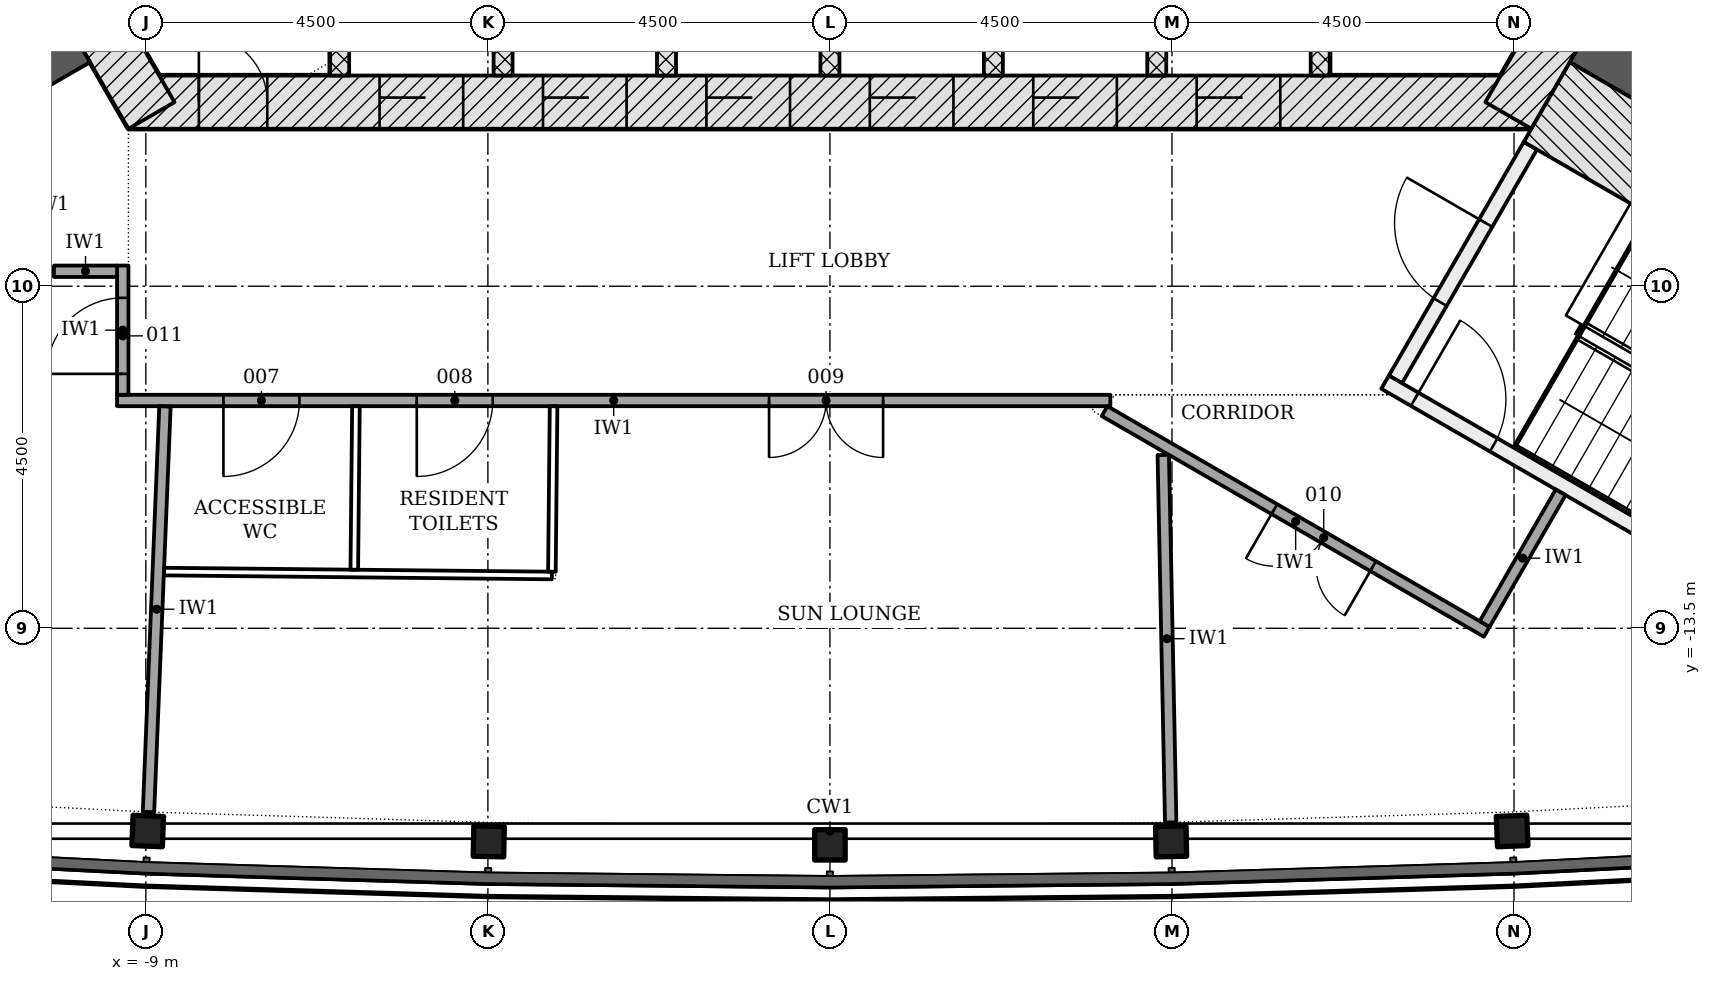
"""IFC4 building model, lengths in metres.
Left out: names, types, materials, properties, quantities, classifications, styles, units other than length and angle.
Written with IfcOpenShell. Run it as: python <this file> out.ifc"""

import sys

from ifc_helpers import new_model, si_unit, direction, frame, frame_2d, origin, origin_2d, place, context, subcontext, project, spatial, rectangle, i_section, extrude, element, fill, save


model = new_model("IFC4")
c1 = context("Model", 3, precision=1e-05, world=origin(), true_north=direction((0.0, 1.0)))
c2 = subcontext(c1, "Body", "Model", "MODEL_VIEW")
j1 = project(units=[si_unit("LENGTHUNIT", "METRE"), si_unit("PLANEANGLEUNIT", "RADIAN")], contexts=[c1])
p1 = place(None, origin())
s1 = spatial("IfcSite", under=j1, at=p1, CompositionType="ELEMENT")
p2 = place(p1, origin())
s2 = spatial("IfcBuilding", under=s1, at=p2, CompositionType="ELEMENT")
p3 = place(p2, frame((0.0, 0.0, 116.7)))
s3 = spatial("IfcBuildingStorey", under=s2, at=p3, CompositionType="ELEMENT", Elevation=116.7)
p4 = place(p3, frame((-9.229, -6.578, -0.2), z_axis=(0.0, 0.0, 1.0), x_axis=(1.0, 0.0, 0.0)))
e1 = element("IfcWall", 1, at=p4, inside=s3, PredefinedType="SHEAR", context=c2, shape_type="SweptSolid", body=[
    extrude(rectangle(XDim=18.458, YDim=0.7, at=frame_2d((9.229, 0.0))), origin(), (0.0, 0.0, 1.0), 3.6),
])
p5 = place(p4, frame((3.304, 0.0, 0.2)))
e2 = element("IfcOpeningElement", 2, at=p5, cuts=e1, PredefinedType="OPENING", context=c2, shape_type="SweptSolid", body=[
    extrude(rectangle(XDim=1.1, YDim=2.1, at=frame_2d((0.55, 1.05))), frame((0.0, 0.36, 0.0), z_axis=(0.0, -1.0, 0.0), x_axis=(1.0, 0.0, 0.0)), (0.0, 0.0, 1.0), 0.72),
])
p6 = place(p4, frame((5.454, 0.0, 0.2)))
e3 = element("IfcOpeningElement", 3, at=p6, cuts=e1, PredefinedType="OPENING", context=c2, shape_type="SweptSolid", body=[
    extrude(rectangle(XDim=1.1, YDim=2.1, at=frame_2d((0.55, 1.05))), frame((0.0, 0.36, 0.0), z_axis=(0.0, -1.0, 0.0), x_axis=(1.0, 0.0, 0.0)), (0.0, 0.0, 1.0), 0.72),
])
p7 = place(p4, frame((7.604, 0.0, 0.2)))
e4 = element("IfcOpeningElement", 4, at=p7, cuts=e1, PredefinedType="OPENING", context=c2, shape_type="SweptSolid", body=[
    extrude(rectangle(XDim=1.1, YDim=2.1, at=frame_2d((0.55, 1.05))), frame((0.0, 0.36, 0.0), z_axis=(0.0, -1.0, 0.0), x_axis=(1.0, 0.0, 0.0)), (0.0, 0.0, 1.0), 0.72),
])
p8 = place(p4, frame((9.754, 0.0, 0.2)))
e5 = element("IfcOpeningElement", 5, at=p8, cuts=e1, PredefinedType="OPENING", context=c2, shape_type="SweptSolid", body=[
    extrude(rectangle(XDim=1.1, YDim=2.1, at=frame_2d((0.55, 1.05))), frame((0.0, 0.36, 0.0), z_axis=(0.0, -1.0, 0.0), x_axis=(1.0, 0.0, 0.0)), (0.0, 0.0, 1.0), 0.72),
])
p9 = place(p4, frame((11.904, 0.0, 0.2)))
e6 = element("IfcOpeningElement", 6, at=p9, cuts=e1, PredefinedType="OPENING", context=c2, shape_type="SweptSolid", body=[
    extrude(rectangle(XDim=1.1, YDim=2.1, at=frame_2d((0.55, 1.05))), frame((0.0, 0.36, 0.0), z_axis=(0.0, -1.0, 0.0), x_axis=(1.0, 0.0, 0.0)), (0.0, 0.0, 1.0), 0.72),
])
p10 = place(p4, frame((14.054, 0.0, 0.2)))
e7 = element("IfcOpeningElement", 7, at=p10, cuts=e1, PredefinedType="OPENING", context=c2, shape_type="SweptSolid", body=[
    extrude(rectangle(XDim=1.1, YDim=2.1, at=frame_2d((0.55, 1.05))), frame((0.0, 0.36, 0.0), z_axis=(0.0, -1.0, 0.0), x_axis=(1.0, 0.0, 0.0)), (0.0, 0.0, 1.0), 0.72),
])
p11 = place(p4, frame((0.926, 0.0, 0.2)))
e8 = element("IfcOpeningElement", 8, at=p11, cuts=e1, PredefinedType="OPENING", context=c2, shape_type="SweptSolid", body=[
    extrude(rectangle(XDim=0.9, YDim=2.1, at=frame_2d((0.45, 1.05))), frame((0.0, 0.36, 0.0), z_axis=(0.0, -1.0, 0.0), x_axis=(1.0, 0.0, 0.0)), (0.0, 0.0, 1.0), 0.72),
])
for number, where, z_axis, x_axis in (
    (9, (8.926, -6.753, -0.2), (0.0, 0.0, 1.0), (0.5, 0.866, 0.0)),
    (10, (-10.311, -4.353, -0.2), (0.0, 0.0, 1.0), (0.5, -0.866, 0.0)),
):
    element("IfcWall", number, at=place(p3, frame(where, z_axis=z_axis, x_axis=x_axis)), inside=s3, PredefinedType="SHEAR", context=c2, shape_type="SweptSolid", body=[
        extrude(rectangle(XDim=2.771, YDim=0.7, at=frame_2d((1.386, 0.0))), origin(), (0.0, 0.0, 1.0), 3.6),
    ])
for number, where, z_axis, x_axis in (
    (11, (-9.922, -5.728, -0.2), (0.0, 0.0, 1.0), (-0.866, -0.5, 0.0)),
    (12, (9.922, -5.728, -0.2), (0.0, 0.0, 1.0), (0.866, -0.5, 0.0)),
):
    element("IfcWall", number, at=place(p3, frame(where, z_axis=z_axis, x_axis=x_axis)), inside=s3, PredefinedType="SHEAR", context=c2, shape_type="SweptSolid", body=[
        extrude(rectangle(XDim=11.539, YDim=0.75, at=frame_2d((5.769, 0.0))), origin(), (0.0, 0.0, 1.0), 3.6),
    ])
for number, where, z_axis, x_axis in (
    (13, (-8.975, -16.167, -0.2), (0.0, 0.0, 1.0), (0.999, -0.041, 0.0)),
    (14, (-4.489, -16.304, -0.2), (0.0, 0.0, 1.0), (1.0, -0.02, 0.0)),
    (15, (0.0, -16.349, -0.2), (0.0, 0.0, 1.0), (1.0, 0.0, 0.0)),
    (16, (4.489, -16.304, -0.2), (0.0, 0.0, 1.0), (1.0, 0.02, 0.0)),
    (17, (8.975, -16.167, -0.2), (0.0, 0.0, 1.0), (0.999, 0.041, 0.0)),
):
    element("IfcColumn", number, at=place(p3, frame(where, z_axis=z_axis, x_axis=x_axis)), inside=s3, PredefinedType="COLUMN", context=c2, shape_type="SweptSolid", body=[
        extrude(i_section(OverallWidth=0.401, OverallDepth=0.399, WebThickness=0.025, FlangeThickness=0.04, FilletRadius=0.015, at=origin_2d()), origin(), (0.0, 0.0, 1.0), 3.6),
    ])
for number, where, z_axis, x_axis in (
    (18, (-6.45, -6.228, -0.2), (0.0, 0.0, 1.0), (0.0, 1.0, 0.0)),
    (19, (-4.3, -6.228, -0.2), (0.0, 0.0, 1.0), (0.0, 1.0, 0.0)),
    (20, (-2.15, -6.228, -0.2), (0.0, 0.0, 1.0), (0.0, 1.0, 0.0)),
    (21, (0.0, -6.228, -0.2), (0.0, 0.0, 1.0), (0.0, 1.0, 0.0)),
    (22, (2.15, -6.228, -0.2), (0.0, 0.0, 1.0), (0.0, 1.0, 0.0)),
    (23, (4.3, -6.228, -0.2), (0.0, 0.0, 1.0), (0.0, 1.0, 0.0)),
    (24, (6.45, -6.228, -0.2), (0.0, 0.0, 1.0), (0.0, 1.0, 0.0)),
):
    element("IfcWall", number, at=place(p3, frame(where, z_axis=z_axis, x_axis=x_axis)), inside=s3, PredefinedType="PARTITIONING", context=c2, shape_type="SweptSolid", body=[
        extrude(rectangle(XDim=2.5, YDim=0.25, at=frame_2d((1.25, 0.0))), origin(), (0.0, 0.0, 1.0), 3.6),
    ])
p12 = place(p3, frame((-10.412, -4.879, -0.2), z_axis=(0.0, 0.0, 1.0), x_axis=(-0.866026919366, -0.499997374926, 0.0)))
e25 = element("IfcWall", 25, at=p12, inside=s3, PredefinedType="SHEAR", context=c2, shape_type="SweptSolid", body=[
    extrude(rectangle(XDim=7.2, YDim=1.211, at=frame_2d((3.6, 0.0))), origin(), (0.0, 0.0, 1.0), 3.6),
])
p13 = place(p3, frame((7.44, -10.226, -0.2), z_axis=(0.0, 0.0, 1.0), x_axis=(0.500022077904, 0.866012656725, 0.0)))
e26 = element("IfcWall", 26, at=p13, inside=s3, PredefinedType="SHEAR", context=c2, shape_type="SweptSolid", body=[
    extrude(rectangle(XDim=3.55, YDim=0.2, at=frame_2d((1.775, 0.0))), origin(), (0.0, 0.0, 1.0), 3.6),
])
p14 = place(p13, frame((1.175, 0.0, 0.2)))
e27 = element("IfcOpeningElement", 27, at=p14, cuts=e26, PredefinedType="OPENING", context=c2, shape_type="SweptSolid", body=[
    extrude(rectangle(XDim=1.2, YDim=2.1, at=frame_2d((0.6, 1.05))), frame((0.0, 0.11, 0.0), z_axis=(0.0, -1.0, 0.0), x_axis=(1.0, 0.0, 0.0)), (0.0, 0.0, 1.0), 0.22),
])
p15 = place(p3, frame((7.304, -10.262, -0.2), z_axis=(0.0, 0.0, 1.0), x_axis=(0.866026594901, -0.49999793692, 0.0)))
e28 = element("IfcWall", 28, at=p15, inside=s3, PredefinedType="SHEAR", context=c2, shape_type="SweptSolid", body=[
    extrude(rectangle(XDim=5.6, YDim=0.2, at=frame_2d((2.8, 0.0))), origin(), (0.0, 0.0, 1.0), 3.6),
])
p16 = place(p15, frame((0.45, 0.0, 0.2)))
e29 = element("IfcOpeningElement", 29, at=p16, cuts=e28, PredefinedType="OPENING", context=c2, shape_type="SweptSolid", body=[
    extrude(rectangle(XDim=1.2, YDim=2.1, at=frame_2d((0.6, 1.05))), frame((0.0, 0.11, 0.0), z_axis=(0.0, -1.0, 0.0), x_axis=(1.0, 0.0, 0.0)), (0.0, 0.0, 1.0), 0.22),
])
p17 = place(p3, frame((9.431, -6.577, -0.2), z_axis=(0.0, 0.0, 1.0), x_axis=(0.866018442252, -0.500012057535, 0.0)))
e30 = element("IfcWall", 30, at=p17, inside=s3, PredefinedType="SHEAR", context=c2, shape_type="SweptSolid", body=[
    extrude(rectangle(XDim=7.2, YDim=1.211, at=frame_2d((3.6, 0.0))), origin(), (0.0, 0.0, 1.0), 3.6),
])
p18 = place(p3, frame((3.689, -10.503, 0.0), z_axis=(0.0, 0.0, 1.0), x_axis=(-1.0, 0.0, 0.0)))
e31 = element("IfcWall", 31, at=p18, inside=s3, PredefinedType="PARTITIONING", context=c2, shape_type="SweptSolid", body=[
    extrude(rectangle(XDim=13.068, YDim=0.15, at=frame_2d((6.534, 0.0))), origin(), (0.0, 0.0, 1.0), 2.847),
])
p19 = place(p18, frame((10.668, 0.0, 0.0)))
e32 = element("IfcOpeningElement", 32, at=p19, cuts=e31, PredefinedType="OPENING", context=c2, shape_type="SweptSolid", body=[
    extrude(rectangle(XDim=1.0, YDim=2.1, at=frame_2d((0.5, 1.05))), frame((0.0, 0.085, 0.0), z_axis=(0.0, -1.0, 0.0), x_axis=(1.0, 0.0, 0.0)), (0.0, 0.0, 1.0), 0.17),
])
p20 = place(p18, frame((8.125, 0.0, 0.0)))
e33 = element("IfcOpeningElement", 33, at=p20, cuts=e31, PredefinedType="OPENING", context=c2, shape_type="SweptSolid", body=[
    extrude(rectangle(XDim=1.0, YDim=2.1, at=frame_2d((0.5, 1.05))), frame((0.0, 0.085, 0.0), z_axis=(0.0, -1.0, 0.0), x_axis=(1.0, 0.0, 0.0)), (0.0, 0.0, 1.0), 0.17),
])
p21 = place(p18, frame((2.99, 0.0, 0.0)))
e34 = element("IfcOpeningElement", 34, at=p21, cuts=e31, PredefinedType="OPENING", context=c2, shape_type="SweptSolid", body=[
    extrude(rectangle(XDim=1.5, YDim=2.1, at=frame_2d((0.75, 1.05))), frame((0.0, 0.085, 0.0), z_axis=(0.0, -1.0, 0.0), x_axis=(1.0, 0.0, 0.0)), (0.0, 0.0, 1.0), 0.17),
])
p22 = place(p3, frame((8.641, -13.546, 0.0), z_axis=(0.0, 0.0, 1.0), x_axis=(-0.866042728627, 0.499969991291, 0.0)))
e35 = element("IfcWall", 35, at=p22, inside=s3, PredefinedType="PARTITIONING", context=c2, shape_type="SweptSolid", body=[
    extrude(rectangle(XDim=5.805, YDim=0.15, at=frame_2d((2.903, 0.0))), origin(), (0.0, 0.0, 1.0), 2.847),
])
p23 = place(p22, frame((1.726, 0.0, 0.0)))
e36 = element("IfcOpeningElement", 36, at=p23, cuts=e35, PredefinedType="OPENING", context=c2, shape_type="SweptSolid", body=[
    extrude(rectangle(XDim=1.5, YDim=2.1, at=frame_2d((0.75, 1.05))), frame((0.0, 0.085, 0.0), z_axis=(0.0, -1.0, 0.0), x_axis=(1.0, 0.0, 0.0)), (0.0, 0.0, 1.0), 0.17),
])
p24 = place(p3, frame((-11.358, -6.99, 0.0), z_axis=(0.0, 0.0, 1.0), x_axis=(0.500050590816, -0.865996193193, 0.0)))
e37 = element("IfcWall", 37, at=p24, inside=s3, PredefinedType="PARTITIONING", context=c2, shape_type="SweptSolid", body=[
    extrude(rectangle(XDim=2.168, YDim=0.15, at=frame_2d((1.084, 0.0))), origin(), (0.0, 0.0, 1.0), 3.4),
])
p25 = place(p3, frame((8.614, -13.444, 0.0), z_axis=(0.0, 0.0, 1.0), x_axis=(0.499972520799, 0.866041268327, 0.0)))
e38 = element("IfcWall", 38, at=p25, inside=s3, PredefinedType="PARTITIONING", context=c2, shape_type="SweptSolid", body=[
    extrude(rectangle(XDim=2.0, YDim=0.15, at=frame_2d((1.0, 0.0))), origin(), (0.0, 0.0, 1.0), 2.923),
])
p26 = place(p3, frame((-9.304, -10.428, 0.0), z_axis=(0.0, 0.0, 1.0), x_axis=(0.0, 1.0, 0.0)))
e39 = element("IfcWall", 39, at=p26, inside=s3, PredefinedType="PARTITIONING", context=c2, shape_type="SweptSolid", body=[
    extrude(rectangle(XDim=1.7, YDim=0.15, at=frame_2d((0.85, 0.0))), origin(), (0.0, 0.0, 1.0), 3.4),
])
p27 = place(p26, frame((0.275, 0.0, 0.0)))
e40 = element("IfcOpeningElement", 40, at=p27, cuts=e39, PredefinedType="OPENING", context=c2, shape_type="SweptSolid", body=[
    extrude(rectangle(XDim=1.0, YDim=2.1, at=frame_2d((0.5, 1.05))), frame((0.0, 0.085, 0.0), z_axis=(0.0, -1.0, 0.0), x_axis=(1.0, 0.0, 0.0)), (0.0, 0.0, 1.0), 0.17),
])
p28 = place(p3, frame((-10.209, -8.803, 0.0), z_axis=(0.0, 0.0, 1.0), x_axis=(1.0, 0.0, 0.0)))
e41 = element("IfcWall", 41, at=p28, inside=s3, PredefinedType="PARTITIONING", context=c2, shape_type="SweptSolid", body=[
    extrude(rectangle(XDim=0.83, YDim=0.15, at=frame_2d((0.415, 0.0))), origin(), (0.0, 0.0, 1.0), 3.4),
])
p29 = place(p3, frame((-8.965, -15.917, 0.0), z_axis=(0.0, 0.0, 1.0), x_axis=(0.040597936434, 0.999175563931, 0.0)))
e42 = element("IfcWall", 42, at=p29, inside=s3, PredefinedType="PARTITIONING", context=c2, shape_type="SweptSolid", body=[
    extrude(rectangle(XDim=5.34, YDim=0.15, at=frame_2d((2.67, 0.0))), origin(), (0.0, 0.0, 1.0), 2.847),
])
p30 = place(p3, frame((4.483, -16.054, 0.0), z_axis=(0.0, 0.0, 1.0), x_axis=(-0.020251440235, 0.999794918555, 0.0)))
e43 = element("IfcWall", 43, at=p30, inside=s3, PredefinedType="PARTITIONING", context=c2, shape_type="SweptSolid", body=[
    extrude(rectangle(XDim=4.834, YDim=0.15, at=frame_2d((2.417, 0.0))), origin(), (0.0, 0.0, 1.0), 2.847),
])
p31 = place(p3, frame((-8.76, -12.754, 0.0), z_axis=(0.0, 0.0, 1.0), x_axis=(0.999948543491, -0.010144474863, 0.0)))
e44 = element("IfcWall", 44, at=p31, inside=s3, PredefinedType="PARTITIONING", context=c2, shape_type="SweptSolid", body=[
    extrude(rectangle(XDim=5.102, YDim=0.1, at=frame_2d((2.551, 0.0))), origin(), (0.0, 0.0, 1.0), 2.847),
])
p32 = place(p3, frame((-3.658, -12.756, 0.0), z_axis=(0.0, 0.0, 1.0), x_axis=(0.010203550433, 0.999947942424, 0.0)))
e45 = element("IfcWall", 45, at=p32, inside=s3, PredefinedType="PARTITIONING", context=c2, shape_type="SweptSolid", body=[
    extrude(rectangle(XDim=2.177, YDim=0.1, at=frame_2d((1.089, 0.0))), origin(), (0.0, 0.0, 1.0), 3.4),
])
p33 = place(p3, frame((-6.258, -12.729, 0.0), z_axis=(0.0, 0.0, 1.0), x_axis=(0.010101641199, 0.999948977121, 0.0)))
e46 = element("IfcWall", 46, at=p33, inside=s3, PredefinedType="PARTITIONING", context=c2, shape_type="SweptSolid", body=[
    extrude(rectangle(XDim=2.151, YDim=0.1, at=frame_2d((1.075, 0.0))), origin(), (0.0, 0.0, 1.0), 3.4),
])
p34 = place(p5, origin())
e47 = element("IfcDoor", 47, at=p34, inside=s3, OperationType="DOUBLE_DOOR_SLIDING", PredefinedType="DOOR", context=c2, shape_type="SweptSolid", body=[
    extrude(rectangle(XDim=1.1, YDim=2.1, at=frame_2d((0.55, 1.05))), frame((0.0, 0.025, 0.0), z_axis=(0.0, -1.0, 0.0), x_axis=(1.0, 0.0, 0.0)), (0.0, 0.0, 1.0), 0.05),
])
fill(e2, e47)
p35 = place(p6, origin())
e48 = element("IfcDoor", 48, at=p35, inside=s3, OperationType="DOUBLE_DOOR_SLIDING", PredefinedType="DOOR", context=c2, shape_type="SweptSolid", body=[
    extrude(rectangle(XDim=1.1, YDim=2.1, at=frame_2d((0.55, 1.05))), frame((0.0, 0.025, 0.0), z_axis=(0.0, -1.0, 0.0), x_axis=(1.0, 0.0, 0.0)), (0.0, 0.0, 1.0), 0.05),
])
fill(e3, e48)
p36 = place(p7, origin())
e49 = element("IfcDoor", 49, at=p36, inside=s3, OperationType="DOUBLE_DOOR_SLIDING", PredefinedType="DOOR", context=c2, shape_type="SweptSolid", body=[
    extrude(rectangle(XDim=1.1, YDim=2.1, at=frame_2d((0.55, 1.05))), frame((0.0, 0.025, 0.0), z_axis=(0.0, -1.0, 0.0), x_axis=(1.0, 0.0, 0.0)), (0.0, 0.0, 1.0), 0.05),
])
fill(e4, e49)
p37 = place(p8, origin())
e50 = element("IfcDoor", 50, at=p37, inside=s3, OperationType="DOUBLE_DOOR_SLIDING", PredefinedType="DOOR", context=c2, shape_type="SweptSolid", body=[
    extrude(rectangle(XDim=1.1, YDim=2.1, at=frame_2d((0.55, 1.05))), frame((0.0, 0.025, 0.0), z_axis=(0.0, -1.0, 0.0), x_axis=(1.0, 0.0, 0.0)), (0.0, 0.0, 1.0), 0.05),
])
fill(e5, e50)
p38 = place(p9, origin())
e51 = element("IfcDoor", 51, at=p38, inside=s3, OperationType="DOUBLE_DOOR_SLIDING", PredefinedType="DOOR", context=c2, shape_type="SweptSolid", body=[
    extrude(rectangle(XDim=1.1, YDim=2.1, at=frame_2d((0.55, 1.05))), frame((0.0, 0.025, 0.0), z_axis=(0.0, -1.0, 0.0), x_axis=(1.0, 0.0, 0.0)), (0.0, 0.0, 1.0), 0.05),
])
fill(e6, e51)
p39 = place(p10, origin())
e52 = element("IfcDoor", 52, at=p39, inside=s3, OperationType="DOUBLE_DOOR_SLIDING", PredefinedType="DOOR", context=c2, shape_type="SweptSolid", body=[
    extrude(rectangle(XDim=1.1, YDim=2.1, at=frame_2d((0.55, 1.05))), frame((0.0, 0.025, 0.0), z_axis=(0.0, -1.0, 0.0), x_axis=(1.0, 0.0, 0.0)), (0.0, 0.0, 1.0), 0.05),
])
fill(e7, e52)
p40 = place(p11, origin())
e53 = element("IfcDoor", 53, at=p40, inside=s3, OperationType="SINGLE_SWING_LEFT", PredefinedType="DOOR", context=c2, shape_type="SweptSolid", body=[
    extrude(rectangle(XDim=0.9, YDim=2.1, at=frame_2d((0.45, 1.05))), frame((0.0, 0.075, 0.0), z_axis=(0.0, -1.0, 0.0), x_axis=(1.0, 0.0, 0.0)), (0.0, 0.0, 1.0), 0.15),
])
fill(e8, e53)
p41 = place(p14, origin())
e54 = element("IfcDoor", 54, at=p41, inside=s3, OperationType="SINGLE_SWING_RIGHT", PredefinedType="DOOR", context=c2, shape_type="SweptSolid", body=[
    extrude(rectangle(XDim=1.2, YDim=2.1, at=frame_2d((0.6, 1.05))), frame((0.0, 0.025, 0.0), z_axis=(0.0, -1.0, 0.0), x_axis=(1.0, 0.0, 0.0)), (0.0, 0.0, 1.0), 0.05),
])
fill(e27, e54)
p42 = place(p16, origin())
e55 = element("IfcDoor", 55, at=p42, inside=s3, OperationType="SINGLE_SWING_LEFT", PredefinedType="DOOR", context=c2, shape_type="SweptSolid", body=[
    extrude(rectangle(XDim=1.2, YDim=2.1, at=frame_2d((0.6, 1.05))), frame((0.0, 0.025, 0.0), z_axis=(0.0, -1.0, 0.0), x_axis=(1.0, 0.0, 0.0)), (0.0, 0.0, 1.0), 0.05),
])
fill(e29, e55)
p43 = place(p19, origin())
e56 = element("IfcDoor", 56, at=p43, inside=s3, OperationType="SINGLE_SWING_RIGHT", PredefinedType="DOOR", context=c2, shape_type="SweptSolid", body=[
    extrude(rectangle(XDim=1.0, YDim=2.1, at=frame_2d((0.5, 1.05))), frame((0.0, 0.025, 0.0), z_axis=(0.0, -1.0, 0.0), x_axis=(1.0, 0.0, 0.0)), (0.0, 0.0, 1.0), 0.05),
])
fill(e32, e56)
p44 = place(p20, origin())
e57 = element("IfcDoor", 57, at=p44, inside=s3, OperationType="SINGLE_SWING_RIGHT", PredefinedType="DOOR", context=c2, shape_type="SweptSolid", body=[
    extrude(rectangle(XDim=1.0, YDim=2.1, at=frame_2d((0.5, 1.05))), frame((0.0, 0.025, 0.0), z_axis=(0.0, -1.0, 0.0), x_axis=(1.0, 0.0, 0.0)), (0.0, 0.0, 1.0), 0.05),
])
fill(e33, e57)
p45 = place(p21, origin())
e58 = element("IfcDoor", 58, at=p45, inside=s3, OperationType="DOUBLE_DOOR_SINGLE_SWING", PredefinedType="DOOR", context=c2, shape_type="SweptSolid", body=[
    extrude(rectangle(XDim=1.5, YDim=2.1, at=frame_2d((0.75, 1.05))), frame((0.0, 0.025, 0.0), z_axis=(0.0, -1.0, 0.0), x_axis=(1.0, 0.0, 0.0)), (0.0, 0.0, 1.0), 0.05),
])
fill(e34, e58)
p46 = place(p23, origin())
e59 = element("IfcDoor", 59, at=p46, inside=s3, OperationType="DOUBLE_DOOR_SINGLE_SWING", PredefinedType="DOOR", context=c2, shape_type="SweptSolid", body=[
    extrude(rectangle(XDim=1.5, YDim=2.1, at=frame_2d((0.75, 1.05))), frame((0.0, 0.025, 0.0), z_axis=(0.0, -1.0, 0.0), x_axis=(1.0, 0.0, 0.0)), (0.0, 0.0, 1.0), 0.05),
])
fill(e36, e59)
p47 = place(p27, origin())
e60 = element("IfcDoor", 60, at=p47, inside=s3, OperationType="SINGLE_SWING_LEFT", PredefinedType="DOOR", context=c2, shape_type="SweptSolid", body=[
    extrude(rectangle(XDim=1.0, YDim=2.1, at=frame_2d((0.5, 1.05))), frame((0.0, 0.025, 0.0), z_axis=(0.0, -1.0, 0.0), x_axis=(1.0, 0.0, 0.0)), (0.0, 0.0, 1.0), 0.05),
])
fill(e40, e60)
save(model, sys.argv[1])
